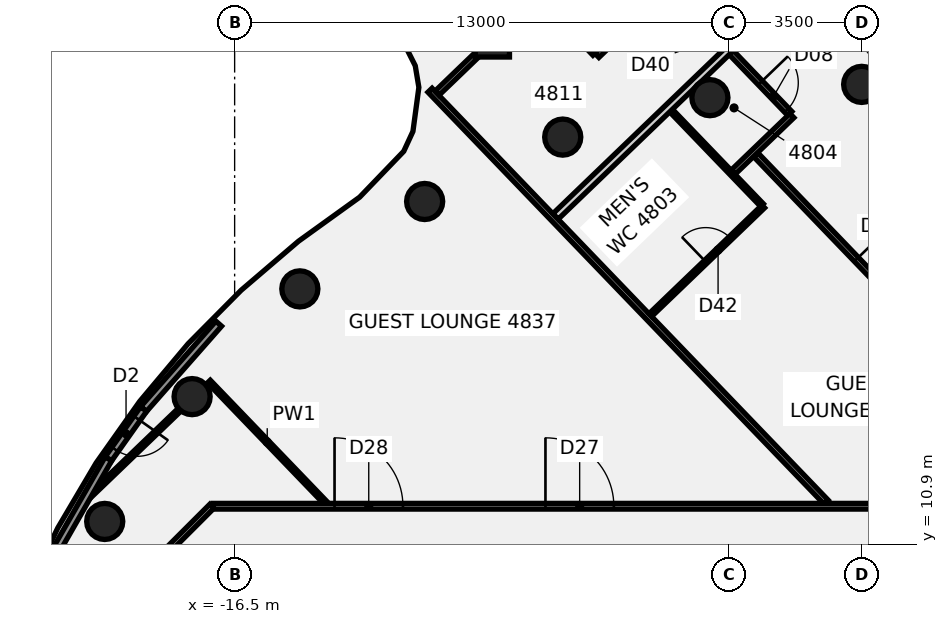
"""IFC4 building model, lengths in metres.
Left out: names, types, materials, properties, quantities, classifications, styles, units other than length and angle.
Written with IfcOpenShell. Run it as: python <this file> out.ifc"""

import sys

from ifc_helpers import new_model, si_unit, direction, frame, frame_2d, origin, origin_2d, place, context, subcontext, project, spatial, rectangle, circle, extrude, element, fill, save


model = new_model("IFC4")
c1 = context("Model", 3, precision=1e-05, world=origin(), true_north=direction((0.0, 1.0)))
c2 = subcontext(c1, "Body", "Model", "MODEL_VIEW")
j1 = project(units=[si_unit("LENGTHUNIT", "METRE"), si_unit("PLANEANGLEUNIT", "RADIAN")], contexts=[c1])
p1 = place(None, origin())
s1 = spatial("IfcSite", under=j1, at=p1, CompositionType="ELEMENT")
p2 = place(p1, origin())
s2 = spatial("IfcBuilding", under=s1, at=p2, CompositionType="ELEMENT")
p3 = place(p2, frame((0.0, 0.0, 193.3)))
s3 = spatial("IfcBuildingStorey", under=s2, at=p3, CompositionType="ELEMENT", Elevation=193.3)
for number, where, z_axis, x_axis in (
    (1, (0.0, 23.0, -0.14), (0.0, 0.0, 1.0), (1.0, 0.0, 0.0)),
    (2, (-3.994, 22.651, -0.14), (0.0, 0.0, 1.0), (1.0, 0.0, 0.0)),
    (3, (-7.866, 21.613, -0.14), (0.0, 0.0, 1.0), (1.0, 0.0, 0.0)),
    (4, (-11.5, 19.919, -0.14), (0.0, 0.0, 1.0), (1.0, 0.0, 0.0)),
    (5, (-14.784, 17.619, -0.14), (0.0, 0.0, 1.0), (1.0, 0.0, 0.0)),
    (6, (-17.619, 14.784, -0.14), (0.0, 0.0, 1.0), (1.0, 0.0, 0.0)),
    (7, (-19.919, 11.5, -0.14), (0.0, 0.0, 1.0), (1.0, 0.0, 0.0)),
):
    element("IfcColumn", number, at=place(p3, frame(where, z_axis=z_axis, x_axis=x_axis)), inside=s3, PredefinedType="COLUMN", context=c2, shape_type="SweptSolid", body=[
        extrude(circle(Radius=0.475, at=origin_2d()), origin(), (0.0, 0.0, 1.0), 3.6),
    ])
p4 = place(p3, frame((-9.718, 24.17, -0.139), z_axis=(-0.010573584179, -0.04927561345, 0.998729249215), x_axis=(0.721101561283, 0.691569981719, 0.041755223636)))
e8 = element("IfcColumn", 8, at=p4, inside=s3, PredefinedType="COLUMN", context=c2, shape_type="SweptSolid", body=[
    extrude(rectangle(XDim=0.9, YDim=0.9, at=origin_2d()), origin(), (0.0, 0.0, 1.0), 3.602),
])
p5 = place(p3, frame((-17.177, 15.182, 0.0), z_axis=(0.0, 0.0, 1.0), x_axis=(0.693132955765, -0.720809756894, 0.0)))
e9 = element("IfcWall", 9, at=p5, inside=s3, PredefinedType="PARTITIONING", context=c2, shape_type="SweptSolid", body=[
    extrude(rectangle(XDim=4.428, YDim=0.1, at=frame_2d((2.214, 0.0))), origin(), (0.0, 0.0, 1.0), 2.864),
])
p6 = place(p3, frame((-9.964, 26.881, 0.0), z_axis=(0.0, 0.0, 1.0), x_axis=(0.693360110244, -0.720591255513, 0.0)))
e10 = element("IfcWall", 10, at=p6, inside=s3, PredefinedType="PARTITIONING", context=c2, shape_type="SweptSolid", body=[
    extrude(rectangle(XDim=4.25, YDim=0.15, at=frame_2d((2.125, 0.0))), origin(), (0.0, 0.0, 1.0), 2.864),
])
p7 = place(p3, frame((-12.802, 33.58, 0.0), z_axis=(0.0, 0.0, 1.0), x_axis=(0.693112745752, -0.720829190361, 0.0)))
e11 = element("IfcWall", 11, at=p7, inside=s3, PredefinedType="PARTITIONING", context=c2, shape_type="SweptSolid", body=[
    extrude(rectangle(XDim=15.741, YDim=0.15, at=frame_2d((7.87, 0.0))), origin(), (0.0, 0.0, 1.0), 2.864),
])
p8 = place(p7, frame((14.621, 0.0, 0.0)))
e12 = element("IfcOpeningElement", 12, at=p8, cuts=e11, PredefinedType="OPENING", context=c2, shape_type="SweptSolid", body=[
    extrude(rectangle(XDim=1.0, YDim=2.1, at=frame_2d((0.5, 1.05))), frame((0.0, 0.085, 0.0), z_axis=(0.0, -1.0, 0.0), x_axis=(1.0, 0.0, 0.0)), (0.0, 0.0, 1.0), 0.17),
])
p9 = place(p7, frame((12.021, 0.0, 0.0)))
e13 = element("IfcOpeningElement", 13, at=p9, cuts=e11, PredefinedType="OPENING", context=c2, shape_type="SweptSolid", body=[
    extrude(rectangle(XDim=0.9, YDim=2.1, at=frame_2d((0.45, 1.05))), frame((0.0, 0.085, 0.0), z_axis=(0.0, -1.0, 0.0), x_axis=(1.0, 0.0, 0.0)), (0.0, 0.0, 1.0), 0.17),
])
p10 = place(p7, frame((5.32, 0.0, 0.0)))
e14 = element("IfcOpeningElement", 14, at=p10, cuts=e11, PredefinedType="OPENING", context=c2, shape_type="SweptSolid", body=[
    extrude(rectangle(XDim=0.9, YDim=2.1, at=frame_2d((0.45, 1.05))), frame((0.0, 0.085, 0.0), z_axis=(0.0, -1.0, 0.0), x_axis=(1.0, 0.0, 0.0)), (0.0, 0.0, 1.0), 0.17),
])
p11 = place(p7, frame((3.02, 0.0, 0.0)))
e15 = element("IfcOpeningElement", 15, at=p11, cuts=e11, PredefinedType="OPENING", context=c2, shape_type="SweptSolid", body=[
    extrude(rectangle(XDim=0.9, YDim=2.1, at=frame_2d((0.45, 1.05))), frame((0.0, 0.085, 0.0), z_axis=(0.0, -1.0, 0.0), x_axis=(1.0, 0.0, 0.0)), (0.0, 0.0, 1.0), 0.17),
])
p12 = place(p3, frame((-11.358, 22.846, 0.0), z_axis=(0.0, 0.0, 1.0), x_axis=(0.69317166013, -0.720772536652, 0.0)))
e16 = element("IfcWall", 16, at=p12, inside=s3, PredefinedType="PARTITIONING", context=c2, shape_type="SweptSolid", body=[
    extrude(rectangle(XDim=15.037, YDim=0.15, at=frame_2d((7.519, 0.0))), origin(), (0.0, 0.0, 1.0), 2.864),
])
p13 = place(p3, frame((-5.016, 22.31, 0.0), z_axis=(0.0, 0.0, 1.0), x_axis=(0.693210521717, -0.720735161193, 0.0)))
e17 = element("IfcWall", 17, at=p13, inside=s3, PredefinedType="PARTITIONING", context=c2, shape_type="SweptSolid", body=[
    extrude(rectangle(XDim=3.45, YDim=0.1, at=frame_2d((1.725, 0.0))), origin(), (0.0, 0.0, 1.0), 2.864),
])
p14 = place(p3, frame((-2.789, 21.149, 0.0), z_axis=(0.0, 0.0, 1.0), x_axis=(0.69313987773, -0.720803100646, 0.0)))
e18 = element("IfcWall", 18, at=p14, inside=s3, PredefinedType="PARTITIONING", context=c2, shape_type="SweptSolid", body=[
    extrude(rectangle(XDim=12.682, YDim=0.15, at=frame_2d((6.341, 0.0))), origin(), (0.0, 0.0, 1.0), 2.864),
])
p15 = place(p14, frame((3.82, 0.0, 0.0)))
e19 = element("IfcOpeningElement", 19, at=p15, cuts=e18, PredefinedType="OPENING", context=c2, shape_type="SweptSolid", body=[
    extrude(rectangle(XDim=1.8, YDim=2.1, at=frame_2d((0.9, 1.05))), frame((0.0, 0.085, 0.0), z_axis=(0.0, -1.0, 0.0), x_axis=(1.0, 0.0, 0.0)), (0.0, 0.0, 1.0), 0.17),
])
p16 = place(p3, frame((-17.065, 11.9, 0.0), z_axis=(0.0, 0.0, 1.0), x_axis=(1.0, 0.0, 0.0)))
e20 = element("IfcWall", 20, at=p16, inside=s3, PredefinedType="PARTITIONING", context=c2, shape_type="SweptSolid", body=[
    extrude(rectangle(XDim=34.165, YDim=0.15, at=frame_2d((17.083, 0.0))), origin(), (0.0, 0.0, 1.0), 2.864),
])
p17 = place(p16, frame((24.071, 0.0, 0.0)))
e21 = element("IfcOpeningElement", 21, at=p17, cuts=e20, PredefinedType="OPENING", context=c2, shape_type="SweptSolid", body=[
    extrude(rectangle(XDim=1.8, YDim=2.1, at=frame_2d((0.9, 1.05))), frame((0.0, 0.085, 0.0), z_axis=(0.0, -1.0, 0.0), x_axis=(1.0, 0.0, 0.0)), (0.0, 0.0, 1.0), 0.17),
])
p18 = place(p16, frame((8.744, 0.0, 0.0)))
e22 = element("IfcOpeningElement", 22, at=p18, cuts=e20, PredefinedType="OPENING", context=c2, shape_type="SweptSolid", body=[
    extrude(rectangle(XDim=1.8, YDim=2.1, at=frame_2d((0.9, 1.05))), frame((0.0, 0.085, 0.0), z_axis=(0.0, -1.0, 0.0), x_axis=(1.0, 0.0, 0.0)), (0.0, 0.0, 1.0), 0.17),
])
p19 = place(p16, frame((3.194, 0.0, 0.0)))
e23 = element("IfcOpeningElement", 23, at=p19, cuts=e20, PredefinedType="OPENING", context=c2, shape_type="SweptSolid", body=[
    extrude(rectangle(XDim=1.8, YDim=2.1, at=frame_2d((0.9, 1.05))), frame((0.0, 0.085, 0.0), z_axis=(0.0, -1.0, 0.0), x_axis=(1.0, 0.0, 0.0)), (0.0, 0.0, 1.0), 0.17),
])
p20 = place(p3, frame((-20.306, 12.174, 0.0), z_axis=(0.0, 0.0, 1.0), x_axis=(0.720860256081, 0.693080436315, 0.0)))
e24 = element("IfcWall", 24, at=p20, inside=s3, PredefinedType="PARTITIONING", context=c2, shape_type="SweptSolid", body=[
    extrude(rectangle(XDim=3.278, YDim=0.1, at=frame_2d((1.639, 0.0))), origin(), (0.0, 0.0, 1.0), 2.864),
])
p21 = place(p3, frame((-11.173, 22.77, 0.0), z_axis=(0.0, 0.0, 1.0), x_axis=(0.720799848532, 0.69314325962, 0.0)))
e25 = element("IfcWall", 25, at=p21, inside=s3, PredefinedType="PARTITIONING", context=c2, shape_type="SweptSolid", body=[
    extrude(rectangle(XDim=1.412, YDim=0.15, at=frame_2d((0.706, 0.0))), origin(), (0.0, 0.0, 1.0), 2.864),
])
p22 = place(p3, frame((-8.054, 19.527, 0.0), z_axis=(0.0, 0.0, 1.0), x_axis=(0.72077697185, 0.693167048301, 0.0)))
e26 = element("IfcWall", 26, at=p22, inside=s3, PredefinedType="PARTITIONING", context=c2, shape_type="SweptSolid", body=[
    extrude(rectangle(XDim=14.219, YDim=0.2, at=frame_2d((7.109, 0.0))), origin(), (0.0, 0.0, 1.0), 2.864),
])
p23 = place(p22, frame((6.62, 0.0, 0.0)))
e27 = element("IfcOpeningElement", 27, at=p23, cuts=e26, PredefinedType="OPENING", context=c2, shape_type="SweptSolid", body=[
    extrude(rectangle(XDim=1.4, YDim=2.1, at=frame_2d((0.7, 1.05))), frame((0.0, 0.11, 0.0), z_axis=(0.0, -1.0, 0.0), x_axis=(1.0, 0.0, 0.0)), (0.0, 0.0, 1.0), 0.22),
])
p24 = place(p3, frame((-6.967, 23.763, 0.0), z_axis=(0.0, 0.0, 1.0), x_axis=(0.720825617884, 0.693116461067, 0.0)))
e28 = element("IfcWall", 28, at=p24, inside=s3, PredefinedType="PARTITIONING", context=c2, shape_type="SweptSolid", body=[
    extrude(rectangle(XDim=2.52, YDim=0.15, at=frame_2d((1.26, 0.0))), origin(), (0.0, 0.0, 1.0), 2.864),
])
p25 = place(p24, frame((0.6, 0.0, 0.0)))
e29 = element("IfcOpeningElement", 29, at=p25, cuts=e28, PredefinedType="OPENING", context=c2, shape_type="SweptSolid", body=[
    extrude(rectangle(XDim=0.9, YDim=2.1, at=frame_2d((0.45, 1.05))), frame((0.0, 0.085, 0.0), z_axis=(0.0, -1.0, 0.0), x_axis=(1.0, 0.0, 0.0)), (0.0, 0.0, 1.0), 0.17),
])
p26 = place(p3, frame((-5.559, 16.931, 0.0), z_axis=(0.0, 0.0, 1.0), x_axis=(0.720864944765, 0.693075559668, 0.0)))
e30 = element("IfcWall", 30, at=p26, inside=s3, PredefinedType="PARTITIONING", context=c2, shape_type="SweptSolid", body=[
    extrude(rectangle(XDim=4.12, YDim=0.1, at=frame_2d((2.06, 0.0))), origin(), (0.0, 0.0, 1.0), 2.864),
])
p27 = place(p26, frame((2.02, 0.0, 0.0)))
e31 = element("IfcOpeningElement", 31, at=p27, cuts=e30, PredefinedType="OPENING", context=c2, shape_type="SweptSolid", body=[
    extrude(rectangle(XDim=0.9, YDim=2.1, at=frame_2d((0.45, 1.05))), frame((0.0, 0.06, 0.0), z_axis=(0.0, -1.0, 0.0), x_axis=(1.0, 0.0, 0.0)), (0.0, 0.0, 1.0), 0.12),
])
p28 = place(p3, frame((-3.378, 20.694, 0.0), z_axis=(0.0, 0.0, 1.0), x_axis=(0.720719068909, 0.693227252574, 0.0)))
e32 = element("IfcWall", 32, at=p28, inside=s3, PredefinedType="PARTITIONING", context=c2, shape_type="SweptSolid", body=[
    extrude(rectangle(XDim=2.14, YDim=0.15, at=frame_2d((1.07, 0.0))), origin(), (0.0, 0.0, 1.0), 2.864),
])
p29 = place(p3, frame((-18.872, 10.128, 0.0), z_axis=(0.0, 0.0, 1.0), x_axis=(0.707106781187, 0.707106781187, 0.0)))
e33 = element("IfcWall", 33, at=p29, inside=s3, PredefinedType="PARTITIONING", context=c2, shape_type="SweptSolid", body=[
    extrude(rectangle(XDim=2.505, YDim=0.15, at=frame_2d((1.253, 0.0))), origin(), (0.0, 0.0, 1.0), 2.864),
])
p30 = place(p3, frame((-16.919, 16.704, 0.0), z_axis=(0.0, 0.0, 1.0), x_axis=(-0.660541435627, -0.750789592243, 0.0)))
e34 = element("IfcWall", 34, at=p30, inside=s3, PredefinedType="SOLIDWALL", context=c2, shape_type="SweptSolid", body=[
    extrude(rectangle(XDim=2.992, YDim=0.2, at=frame_2d((1.496, 0.0))), origin(), (0.0, 0.0, 1.0), 3.46),
])
p31 = place(p3, frame((-19.82, 13.151, 0.0), z_axis=(0.0, 0.0, 1.0), x_axis=(-0.496622268508, -0.867966774953, 0.0)))
e35 = element("IfcWall", 35, at=p31, inside=s3, PredefinedType="SOLIDWALL", context=c2, shape_type="SweptSolid", body=[
    extrude(rectangle(XDim=2.991, YDim=0.2, at=frame_2d((1.496, 0.0))), origin(), (0.0, 0.0, 1.0), 3.46),
])
p32 = place(p3, frame((-18.896, 14.458, 0.0), z_axis=(0.0, 0.0, 1.0), x_axis=(-0.57755153974, -0.816354223939, 0.0)))
e36 = element("IfcWall", 36, at=p32, inside=s3, PredefinedType="SOLIDWALL", context=c2, shape_type="SweptSolid", body=[
    extrude(rectangle(XDim=1.6, YDim=0.2, at=frame_2d((0.8, 0.0))), origin(), (0.0, 0.0, 1.0), 3.46),
])
p33 = place(p32, frame((0.3, 0.0, 0.0)))
e37 = element("IfcOpeningElement", 37, at=p33, cuts=e36, PredefinedType="OPENING", context=c2, shape_type="SweptSolid", body=[
    extrude(rectangle(XDim=1.0, YDim=2.4, at=frame_2d((0.5, 1.2))), frame((0.0, 0.11, 0.0), z_axis=(0.0, -1.0, 0.0), x_axis=(1.0, 0.0, 0.0)), (0.0, 0.0, 1.0), 0.22),
])
p34 = place(p8, frame((1.0, 0.0, 0.0), z_axis=(0.0, 0.0, 1.0), x_axis=(-1.0, 0.0, 0.0)))
e38 = element("IfcDoor", 38, at=p34, inside=s3, OperationType="SINGLE_SWING_RIGHT", PredefinedType="DOOR", context=c2, shape_type="SweptSolid", body=[
    extrude(rectangle(XDim=1.0, YDim=2.1, at=frame_2d((0.5, 1.05))), frame((0.0, 0.025, 0.0), z_axis=(0.0, -1.0, 0.0), x_axis=(1.0, 0.0, 0.0)), (0.0, 0.0, 1.0), 0.05),
])
fill(e12, e38)
p35 = place(p15, frame((1.8, 0.0, 0.0), z_axis=(0.0, 0.0, 1.0), x_axis=(-1.0, 0.0, 0.0)))
e39 = element("IfcDoor", 39, at=p35, inside=s3, OperationType="DOUBLE_DOOR_SINGLE_SWING", PredefinedType="DOOR", context=c2, shape_type="SweptSolid", body=[
    extrude(rectangle(XDim=1.8, YDim=2.1, at=frame_2d((0.9, 1.05))), frame((0.0, 0.025, 0.0), z_axis=(0.0, -1.0, 0.0), x_axis=(1.0, 0.0, 0.0)), (0.0, 0.0, 1.0), 0.05),
])
fill(e19, e39)
p36 = place(p18, origin())
e40 = element("IfcDoor", 40, at=p36, inside=s3, OperationType="DOUBLE_DOOR_SINGLE_SWING", PredefinedType="DOOR", context=c2, shape_type="SweptSolid", body=[
    extrude(rectangle(XDim=1.8, YDim=2.1, at=frame_2d((0.9, 1.05))), frame((0.0, 0.025, 0.0), z_axis=(0.0, -1.0, 0.0), x_axis=(1.0, 0.0, 0.0)), (0.0, 0.0, 1.0), 0.05),
])
fill(e22, e40)
p37 = place(p19, origin())
e41 = element("IfcDoor", 41, at=p37, inside=s3, OperationType="DOUBLE_DOOR_SINGLE_SWING", PredefinedType="DOOR", context=c2, shape_type="SweptSolid", body=[
    extrude(rectangle(XDim=1.8, YDim=2.1, at=frame_2d((0.9, 1.05))), frame((0.0, 0.025, 0.0), z_axis=(0.0, -1.0, 0.0), x_axis=(1.0, 0.0, 0.0)), (0.0, 0.0, 1.0), 0.05),
])
fill(e23, e41)
p38 = place(p27, origin())
e42 = element("IfcDoor", 42, at=p38, inside=s3, OperationType="SINGLE_SWING_LEFT", PredefinedType="DOOR", context=c2, shape_type="SweptSolid", body=[
    extrude(rectangle(XDim=0.9, YDim=2.1, at=frame_2d((0.45, 1.05))), frame((0.0, 0.025, 0.0), z_axis=(0.0, -1.0, 0.0), x_axis=(1.0, 0.0, 0.0)), (0.0, 0.0, 1.0), 0.05),
])
fill(e31, e42)
p39 = place(p33, origin())
e43 = element("IfcDoor", 43, at=p39, inside=s3, OperationType="SINGLE_SWING_LEFT", PredefinedType="DOOR", context=c2, shape_type="SweptSolid", body=[
    extrude(rectangle(XDim=1.0, YDim=2.4, at=frame_2d((0.5, 1.2))), frame((0.0, 0.025, 0.0), z_axis=(0.0, -1.0, 0.0), x_axis=(1.0, 0.0, 0.0)), (0.0, 0.0, 1.0), 0.05),
])
fill(e37, e43)
save(model, sys.argv[1])
